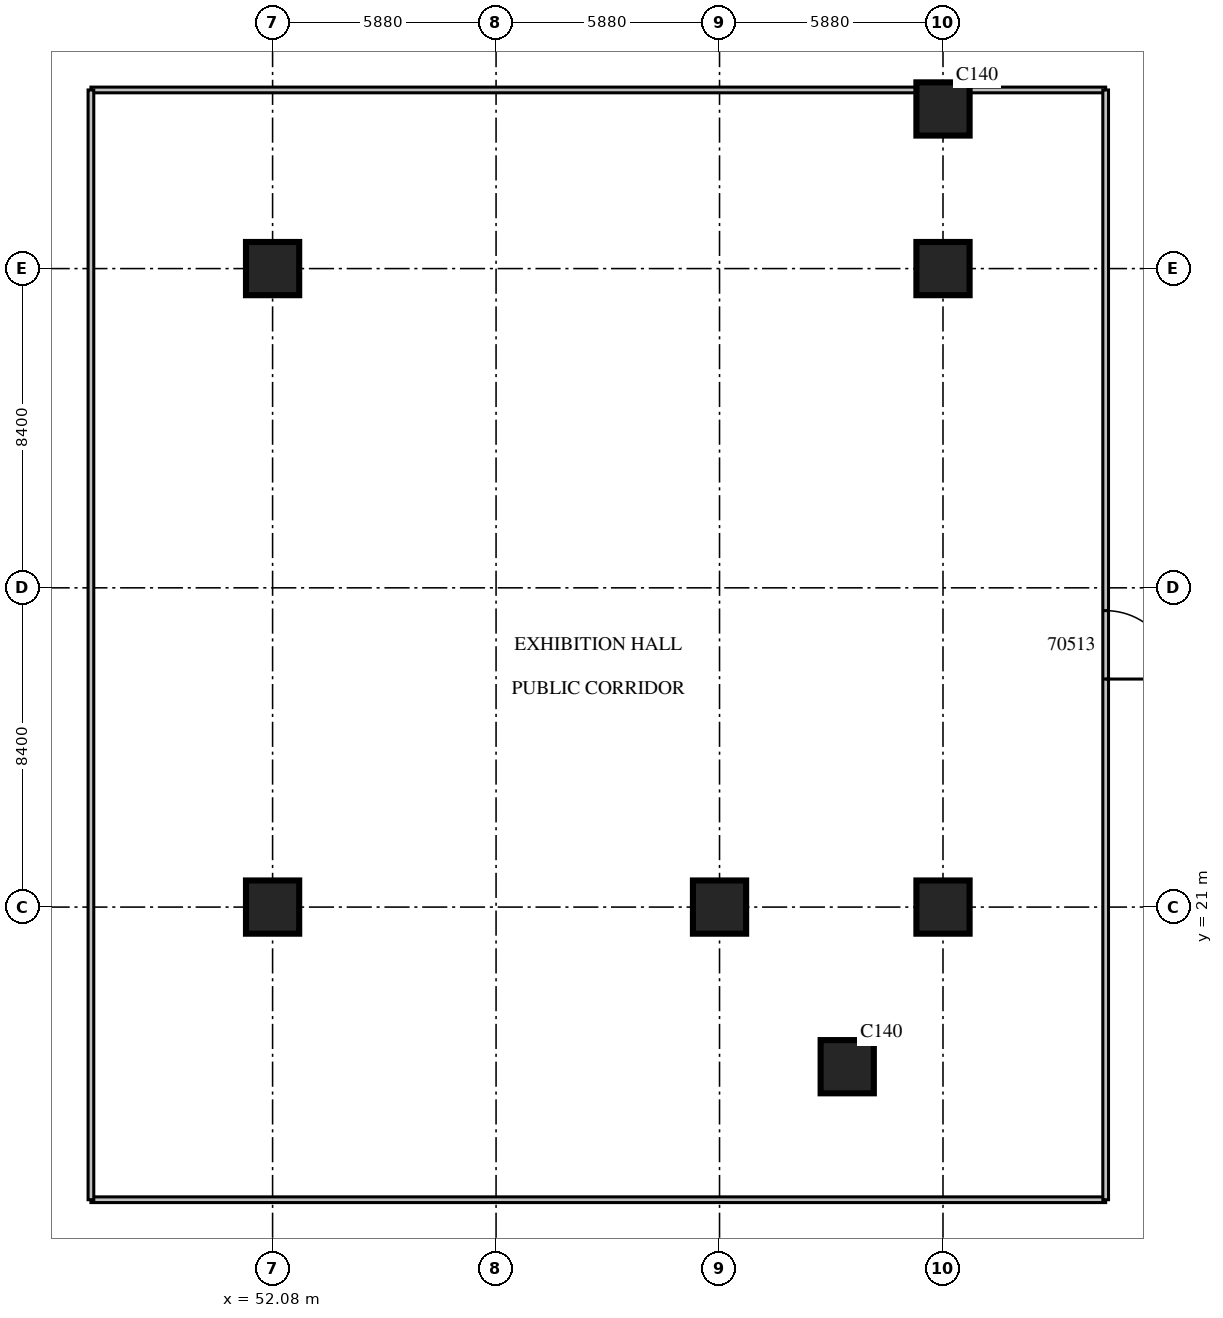
"""IFC4 building model, lengths in metres.
Left out: names, types, materials, properties, quantities, classifications, styles, units other than length and angle.
Written with IfcOpenShell. Run it as: python <this file> out.ifc"""

import sys

from ifc_helpers import new_model, si_unit, direction, frame, frame_2d, origin, origin_2d, place, context, subcontext, project, spatial, rectangle, extrude, source, transform, mapped, element, fill, save


model = new_model("IFC4")
c1 = context("Model", 3, precision=1e-05, world=origin(), true_north=direction((0.0, 1.0)))
c2 = subcontext(c1, "Body", "Model", "MODEL_VIEW")
j1 = project(units=[si_unit("LENGTHUNIT", "METRE"), si_unit("PLANEANGLEUNIT", "RADIAN")], contexts=[c1])
p1 = place(None, origin())
s1 = spatial("IfcSite", under=j1, at=p1, CompositionType="ELEMENT")
p2 = place(p1, origin())
s2 = spatial("IfcBuilding", under=s1, at=p2, CompositionType="ELEMENT")
p3 = place(p2, frame((0.0, 0.0, 12.9)))
s3 = spatial("IfcBuildingStorey", under=s2, at=p3, CompositionType="ELEMENT", Elevation=12.9)
m1 = source(origin(), c2, "Body", "SweptSolid", [
    extrude(rectangle(XDim=1.4, YDim=1.4, at=origin_2d()), origin(), (0.0, 0.0, 1.0), 5.4),
])
for number, where, z_axis, x_axis in (
    (1, (52.08, 21.0, 0.0), (0.0, 0.0, 1.0), (1.0, 0.0, 0.0)),
    (2, (52.08, 37.8, 0.0), (0.0, 0.0, 1.0), (1.0, 0.0, 0.0)),
    (3, (63.84, 21.0, 0.0), (0.0, 0.0, 1.0), (1.0, 0.0, 0.0)),
    (4, (67.2, 16.8, 0.0), (0.0, 0.0, 1.0), (1.0, 0.0, 0.0)),
    (5, (69.72, 21.0, 0.0), (0.0, 0.0, 1.0), (1.0, 0.0, 0.0)),
    (6, (69.72, 37.8, 0.0), (0.0, 0.0, 1.0), (1.0, 0.0, 0.0)),
    (7, (69.72, 42.0, 0.0), (0.0, 0.0, 1.0), (1.0, 0.0, 0.0)),
):
    element("IfcColumn", number, at=place(p3, frame(where, z_axis=z_axis, x_axis=x_axis)), inside=s3, PredefinedType="COLUMN", context=c2, shape_type="MappedRepresentation", body=[
        mapped(m1, transform((0.0, 0.0, 0.0), scale=1.0)),
    ])
m2 = source(origin(), c2, "Body", "SweptSolid", [
    extrude(rectangle(XDim=26.7, YDim=0.15, at=frame_2d((13.35, 0.0))), origin(), (0.0, 0.0, 1.0), 4.8),
])
for number, where, z_axis, x_axis in (
    (8, (47.3, 13.3, 0.0), (0.0, 0.0, 1.0), (1.0, 0.0, 0.0)),
    (9, (47.3, 42.5, 0.0), (0.0, 0.0, 1.0), (1.0, 0.0, 0.0)),
):
    element("IfcWall", number, at=place(p3, frame(where, z_axis=z_axis, x_axis=x_axis)), inside=s3, PredefinedType="PARTITIONING", context=c2, shape_type="MappedRepresentation", body=[
        mapped(m2, transform((0.0, 0.0, 0.0), scale=1.0)),
    ])
m3 = source(origin(), c2, "Body", "SweptSolid", [
    extrude(rectangle(XDim=29.2, YDim=0.15, at=frame_2d((14.6, 0.0))), origin(), (0.0, 0.0, 1.0), 4.8),
])
p4 = place(p3, frame((47.3, 13.3, 0.0), z_axis=(0.0, 0.0, 1.0), x_axis=(0.0, 1.0, 0.0)))
e10 = element("IfcWall", 10, at=p4, inside=s3, PredefinedType="PARTITIONING", context=c2, shape_type="MappedRepresentation", body=[
    mapped(m3, transform((0.0, 0.0, 0.0), scale=1.0)),
])
p5 = place(p3, frame((74.0, 13.3, 0.0), z_axis=(0.0, 0.0, 1.0), x_axis=(0.0, 1.0, 0.0)))
e11 = element("IfcWall", 11, at=p5, inside=s3, PredefinedType="PARTITIONING", context=c2, shape_type="MappedRepresentation", body=[
    mapped(m3, transform((0.0, 0.0, 0.0), scale=1.0)),
])
m4 = source(origin(), c2, "Body", "SweptSolid", [
    extrude(rectangle(XDim=1.8, YDim=2.1, at=frame_2d((0.9, 1.05))), frame((0.0, 0.085, 0.0), z_axis=(0.0, -1.0, 0.0), x_axis=(1.0, 0.0, 0.0)), (0.0, 0.0, 1.0), 0.17),
])
p6 = place(p5, frame((13.7, 0.0, 0.0)))
e12 = element("IfcOpeningElement", 12, at=p6, cuts=e11, PredefinedType="OPENING", context=c2, shape_type="MappedRepresentation", body=[
    mapped(m4, transform((0.0, 0.0, 0.0), scale=1.0)),
])
m5 = source(origin(), c2, "Body", "SweptSolid", [
    extrude(rectangle(XDim=1.8, YDim=2.1, at=frame_2d((0.9, 1.05))), frame((0.0, 0.025, 0.0), z_axis=(0.0, -1.0, 0.0), x_axis=(1.0, 0.0, 0.0)), (0.0, 0.0, 1.0), 0.05),
])
p7 = place(p6, origin())
e13 = element("IfcDoor", 13, at=p7, inside=s3, OperationType="DOUBLE_DOOR_SINGLE_SWING", PredefinedType="DOOR", context=c2, shape_type="MappedRepresentation", body=[
    mapped(m5, transform((0.0, 0.0, 0.0), scale=1.0)),
])
fill(e12, e13)
save(model, sys.argv[1])
